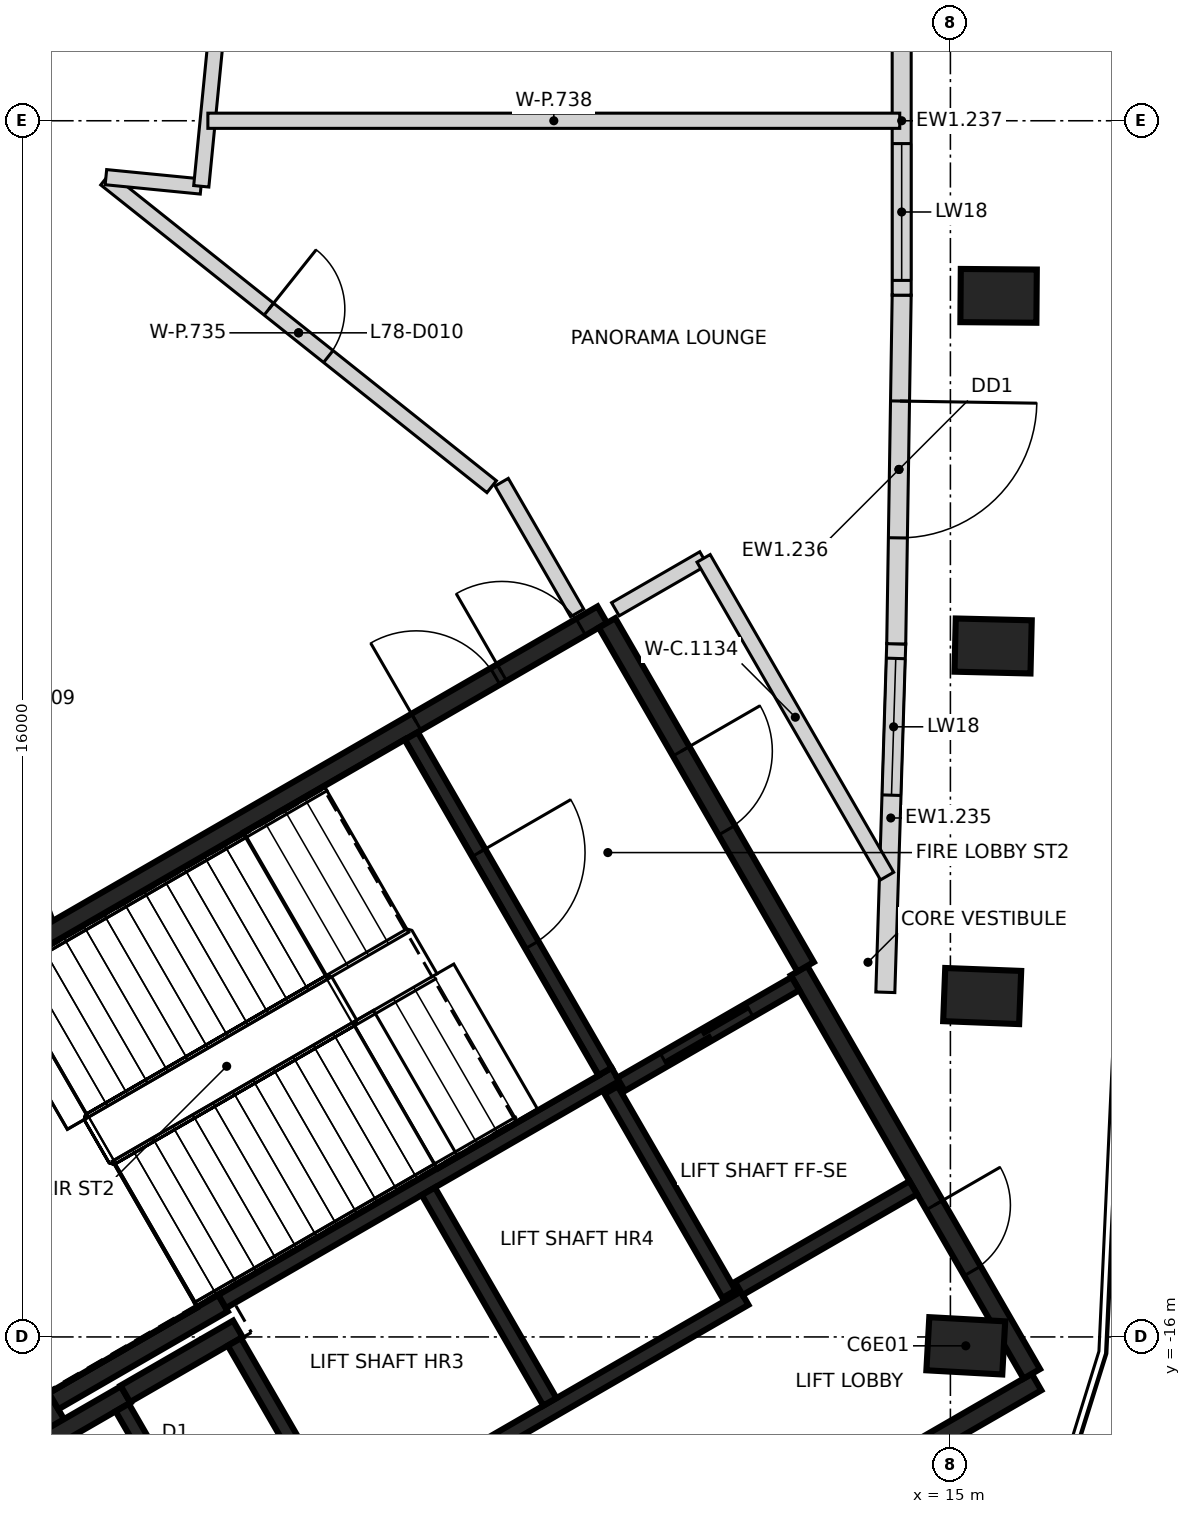
"""IFC4 building model, lengths in metres.
Left out: names, types, materials, properties, quantities, classifications, styles, units other than length and angle.
Written with IfcOpenShell. Run it as: python <this file> out.ifc"""

import sys

from ifc_helpers import new_model, si_unit, direction, frame, frame_2d, origin, origin_2d, place, context, subcontext, project, spatial, rectangle, extrude, element, fill, save


model = new_model("IFC4")
c1 = context("Model", 3, precision=1e-05, world=origin(), true_north=direction((0.0, 1.0)))
c2 = subcontext(c1, "Body", "Model", "MODEL_VIEW")
j1 = project(units=[si_unit("LENGTHUNIT", "METRE"), si_unit("PLANEANGLEUNIT", "RADIAN")], contexts=[c1])
p1 = place(None, origin())
s1 = spatial("IfcSite", under=j1, at=p1, CompositionType="ELEMENT")
p2 = place(p1, origin())
s2 = spatial("IfcBuilding", under=s1, at=p2, CompositionType="ELEMENT")
p3 = place(p2, frame((0.0, 0.0, 312.6)))
s3 = spatial("IfcBuildingStorey", under=s2, at=p3, CompositionType="ELEMENT", Elevation=312.6)
for number, where, z_axis, x_axis in (
    (1, (15.202, -16.117, -0.35), (0.0, 0.0, 1.0), (-0.998, 0.055, 0.0)),
    (2, (15.418, -11.515, -0.35), (0.0, 0.0, 1.0), (-0.999, 0.039, 0.0)),
    (3, (15.562, -6.91, -0.35), (0.0, 0.0, 1.0), (-1.0, 0.024, 0.0)),
    (4, (15.634, -2.303, -0.35), (0.0, 0.0, 1.0), (-1.0, 0.008, 0.0)),
):
    element("IfcColumn", number, at=place(p3, frame(where, z_axis=z_axis, x_axis=x_axis)), inside=s3, PredefinedType="COLUMN", context=c2, shape_type="SweptSolid", body=[
        extrude(rectangle(XDim=1.0, YDim=0.7, at=origin_2d()), origin(), (0.0, 0.0, 1.0), 8.1),
    ])
p4 = place(p3, frame((14.287, -6.88, 0.0), z_axis=(0.0, 0.0, 1.0), x_axis=(-0.03123309125, -0.999512127996, 0.0)))
e5 = element("IfcWall", 5, at=p4, inside=s3, PredefinedType="SOLIDWALL", context=c2, shape_type="SweptSolid", body=[
    extrude(rectangle(XDim=4.588, YDim=0.25, at=frame_2d((2.294, 0.0))), origin(), (0.0, 0.0, 1.0), 7.75),
])
p5 = place(p4, frame((0.194, 0.0, 0.9)))
e6 = element("IfcOpeningElement", 6, at=p5, cuts=e5, PredefinedType="OPENING", context=c2, shape_type="SweptSolid", body=[
    extrude(rectangle(XDim=1.8, YDim=2.4, at=frame_2d((0.9, 1.2))), frame((0.0, 0.135, 0.0), z_axis=(0.0, -1.0, 0.0), x_axis=(1.0, 0.0, 0.0)), (0.0, 0.0, 1.0), 0.27),
])
p6 = place(p3, frame((14.359, -2.293, 0.0), z_axis=(0.0, 0.0, 1.0), x_axis=(-0.015639712785, -0.999877692212, 0.0)))
e7 = element("IfcWall", 7, at=p6, inside=s3, PredefinedType="SOLIDWALL", context=c2, shape_type="SweptSolid", body=[
    extrude(rectangle(XDim=4.589, YDim=0.25, at=frame_2d((2.295, 0.0))), origin(), (0.0, 0.0, 1.0), 7.75),
])
p7 = place(p6, frame((1.395, 0.0, 0.0)))
e8 = element("IfcOpeningElement", 8, at=p7, cuts=e7, PredefinedType="OPENING", context=c2, shape_type="SweptSolid", body=[
    extrude(rectangle(XDim=1.8, YDim=2.4, at=frame_2d((0.9, 1.2))), frame((0.0, 0.135, 0.0), z_axis=(0.0, -1.0, 0.0), x_axis=(1.0, 0.0, 0.0)), (0.0, 0.0, 1.0), 0.27),
])
p8 = place(p3, frame((14.359, 2.295, 0.0), z_axis=(0.0, 0.0, 1.0), x_axis=(0.0, -1.0, 0.0)))
e9 = element("IfcWall", 9, at=p8, inside=s3, PredefinedType="SOLIDWALL", context=c2, shape_type="SweptSolid", body=[
    extrude(rectangle(XDim=4.589, YDim=0.25, at=frame_2d((2.295, 0.0))), origin(), (0.0, 0.0, 1.0), 7.75),
])
p9 = place(p8, frame((2.595, 0.0, 0.9)))
e10 = element("IfcOpeningElement", 10, at=p9, cuts=e9, PredefinedType="OPENING", context=c2, shape_type="SweptSolid", body=[
    extrude(rectangle(XDim=1.8, YDim=2.4, at=frame_2d((0.9, 1.2))), frame((0.0, 0.135, 0.0), z_axis=(0.0, -1.0, 0.0), x_axis=(1.0, 0.0, 0.0)), (0.0, 0.0, 1.0), 0.27),
])
p10 = place(p3, frame((0.417, -12.273, 0.0), z_axis=(0.0, 0.0, 1.0), x_axis=(0.866021906294, 0.500006057782, 0.0)))
e11 = element("IfcWall", 11, at=p10, inside=s3, PredefinedType="SHEAR", context=c2, shape_type="SweptSolid", body=[
    extrude(rectangle(XDim=11.55, YDim=0.25, at=frame_2d((5.775, 0.0))), origin(), (0.0, 0.0, 1.0), 7.75),
])
p11 = place(p10, frame((10.025, 0.0, 0.0)))
e12 = element("IfcOpeningElement", 12, at=p11, cuts=e11, PredefinedType="OPENING", context=c2, shape_type="SweptSolid", body=[
    extrude(rectangle(XDim=1.2, YDim=2.1, at=frame_2d((0.6, 1.05))), frame((0.0, 0.135, 0.0), z_axis=(0.0, -1.0, 0.0), x_axis=(1.0, 0.0, 0.0)), (0.0, 0.0, 1.0), 0.27),
])
p12 = place(p10, frame((8.725, 0.0, 0.0)))
e13 = element("IfcOpeningElement", 13, at=p12, cuts=e11, PredefinedType="OPENING", context=c2, shape_type="SweptSolid", body=[
    extrude(rectangle(XDim=1.2, YDim=2.1, at=frame_2d((0.6, 1.05))), frame((0.0, 0.135, 0.0), z_axis=(0.0, -1.0, 0.0), x_axis=(1.0, 0.0, 0.0)), (0.0, 0.0, 1.0), 0.27),
])
p13 = place(p3, frame((16.133, -16.594, 0.0), z_axis=(0.0, 0.0, 1.0), x_axis=(-0.866022959057, -0.500004234368, 0.0)))
e14 = element("IfcWall", 14, at=p13, inside=s3, PredefinedType="SHEAR", context=c2, shape_type="SweptSolid", body=[
    extrude(rectangle(XDim=8.75, YDim=0.25, at=frame_2d((4.375, 0.0))), origin(), (0.0, 0.0, 1.0), 7.75),
])
p14 = place(p13, frame((3.425, 0.0, 0.0)))
e15 = element("IfcOpeningElement", 15, at=p14, cuts=e14, PredefinedType="OPENING", context=c2, shape_type="SweptSolid", body=[
    extrude(rectangle(XDim=0.9, YDim=2.1, at=frame_2d((0.45, 1.05))), frame((0.0, 0.135, 0.0), z_axis=(0.0, -1.0, 0.0), x_axis=(1.0, 0.0, 0.0)), (0.0, 0.0, 1.0), 0.27),
])
p15 = place(p3, frame((13.008, -11.181, 0.0), z_axis=(0.0, 0.0, 1.0), x_axis=(0.500001955336, -0.866024274868, 0.0)))
e16 = element("IfcWall", 16, at=p15, inside=s3, PredefinedType="SHEAR", context=c2, shape_type="SweptSolid", body=[
    extrude(rectangle(XDim=6.125, YDim=0.25, at=frame_2d((3.062, 0.0))), origin(), (0.0, 0.0, 1.0), 7.75),
])
p16 = place(p15, frame((3.563, 0.0, 0.0)))
e17 = element("IfcOpeningElement", 17, at=p16, cuts=e16, PredefinedType="OPENING", context=c2, shape_type="SweptSolid", body=[
    extrude(rectangle(XDim=1.0, YDim=2.1, at=frame_2d((0.5, 1.05))), frame((0.0, 0.135, 0.0), z_axis=(0.0, -1.0, 0.0), x_axis=(1.0, 0.0, 0.0)), (0.0, 0.0, 1.0), 0.27),
])
p17 = place(p3, frame((3.235, -17.153, 0.0), z_axis=(0.0, 0.0, 1.0), x_axis=(-0.500008851346, 0.866020293397, 0.0)))
e18 = element("IfcWall", 18, at=p17, inside=s3, PredefinedType="SHEAR", context=c2, shape_type="SweptSolid", body=[
    extrude(rectangle(XDim=5.51, YDim=0.25, at=frame_2d((2.755, 0.0))), origin(), (0.0, 0.0, 1.0), 7.75),
])
p18 = place(p3, frame((10.483, -6.606, 0.0), z_axis=(0.0, 0.0, 1.0), x_axis=(0.49999885962, -0.866026062182, 0.0)))
e19 = element("IfcWall", 19, at=p18, inside=s3, PredefinedType="SHEAR", context=c2, shape_type="SweptSolid", body=[
    extrude(rectangle(XDim=5.225, YDim=0.25, at=frame_2d((2.612, 0.0))), origin(), (0.0, 0.0, 1.0), 7.75),
])
p19 = place(p18, frame((1.95, 0.0, 0.0)))
e20 = element("IfcOpeningElement", 20, at=p19, cuts=e19, PredefinedType="OPENING", context=c2, shape_type="SweptSolid", body=[
    extrude(rectangle(XDim=1.2, YDim=2.1, at=frame_2d((0.6, 1.05))), frame((0.0, 0.135, 0.0), z_axis=(0.0, -1.0, 0.0), x_axis=(1.0, 0.0, 0.0)), (0.0, 0.0, 1.0), 0.27),
])
p20 = place(p3, frame((1.669, -18.19, 0.0), z_axis=(0.0, 0.0, 1.0), x_axis=(0.866042235819, 0.499970844928, 0.0)))
e21 = element("IfcWall", 21, at=p20, inside=s3, PredefinedType="SHEAR", context=c2, shape_type="SweptSolid", body=[
    extrude(rectangle(XDim=2.865, YDim=0.25, at=frame_2d((1.432, 0.0))), origin(), (0.0, 0.0, 1.0), 7.75),
])
p21 = place(p3, frame((5.431, -15.556, 0.0), z_axis=(0.0, 0.0, 1.0), x_axis=(-0.866022940537, -0.500004266446, 0.0)))
e22 = element("IfcWall", 22, at=p21, inside=s3, PredefinedType="SHEAR", context=c2, shape_type="SweptSolid", body=[
    extrude(rectangle(XDim=2.575, YDim=0.25, at=frame_2d((1.287, 0.0))), origin(), (0.0, 0.0, 1.0), 7.75),
])
p22 = place(p3, frame((4.145, -16.749, 0.0), z_axis=(0.0, 0.0, 1.0), x_axis=(0.866038183914, 0.499977863513, 0.0)))
e23 = element("IfcWall", 23, at=p22, inside=s3, PredefinedType="SHEAR", context=c2, shape_type="SweptSolid", body=[
    extrude(rectangle(XDim=1.71, YDim=0.25, at=frame_2d((0.855, 0.0))), origin(), (0.0, 0.0, 1.0), 7.75),
])
p23 = place(p3, frame((5.419, -15.534, 0.0), z_axis=(0.0, 0.0, 1.0), x_axis=(0.866029065029, 0.499993658486, 0.0)))
e24 = element("IfcWall", 24, at=p23, inside=s3, PredefinedType="SHEAR", context=c2, shape_type="SweptSolid", body=[
    extrude(rectangle(XDim=5.974, YDim=0.2, at=frame_2d((2.987, 0.0))), origin(), (0.0, 0.0, 1.0), 7.75),
])
p24 = place(p3, frame((7.01, -18.542, 0.0), z_axis=(0.0, 0.0, 1.0), x_axis=(0.866030299012, 0.499991521122, 0.0)))
e25 = element("IfcWall", 25, at=p24, inside=s3, PredefinedType="SHEAR", context=c2, shape_type="SweptSolid", body=[
    extrude(rectangle(XDim=6.1, YDim=0.2, at=frame_2d((3.05, 0.0))), origin(), (0.0, 0.0, 1.0), 7.75),
])
p25 = place(p3, frame((7.906, -8.094, 0.0), z_axis=(0.0, 0.0, 1.0), x_axis=(0.500027839223, -0.866009330205, 0.0)))
e26 = element("IfcWall", 26, at=p25, inside=s3, PredefinedType="SHEAR", context=c2, shape_type="SweptSolid", body=[
    extrude(rectangle(XDim=5.098, YDim=0.2, at=frame_2d((2.549, 0.0))), origin(), (0.0, 0.0, 1.0), 7.75),
])
p26 = place(p25, frame((1.774, 0.0, 0.0)))
e27 = element("IfcOpeningElement", 27, at=p26, cuts=e26, PredefinedType="OPENING", context=c2, shape_type="SweptSolid", body=[
    extrude(rectangle(XDim=1.4, YDim=2.1, at=frame_2d((0.7, 1.05))), frame((0.0, 0.11, 0.0), z_axis=(0.0, -1.0, 0.0), x_axis=(1.0, 0.0, 0.0)), (0.0, 0.0, 1.0), 0.22),
])
p27 = place(p3, frame((8.132, -14.084, 0.0), z_axis=(0.0, 0.0, 1.0), x_axis=(0.499997778408, -0.866026686418, 0.0)))
e28 = element("IfcWall", 28, at=p27, inside=s3, PredefinedType="SHEAR", context=c2, shape_type="SweptSolid", body=[
    extrude(rectangle(XDim=3.198, YDim=0.2, at=frame_2d((1.599, 0.0))), origin(), (0.0, 0.0, 1.0), 7.75),
])
p28 = place(p3, frame((5.503, -19.352, 0.0), z_axis=(0.0, 0.0, 1.0), x_axis=(-0.499986818241, 0.866033014143, 0.0)))
e29 = element("IfcWall", 29, at=p28, inside=s3, PredefinedType="SHEAR", context=c2, shape_type="SweptSolid", body=[
    extrude(rectangle(XDim=2.798, YDim=0.2, at=frame_2d((1.399, 0.0))), origin(), (0.0, 0.0, 1.0), 7.75),
])
p29 = place(p28, frame((0.949, 0.0, 0.0)))
e30 = element("IfcOpeningElement", 30, at=p29, cuts=e29, PredefinedType="OPENING", context=c2, shape_type="SweptSolid", body=[
    extrude(rectangle(XDim=0.9, YDim=2.1, at=frame_2d((0.45, 1.05))), frame((0.0, 0.11, 0.0), z_axis=(0.0, -1.0, 0.0), x_axis=(1.0, 0.0, 0.0)), (0.0, 0.0, 1.0), 0.22),
])
p30 = place(p3, frame((6.96, -18.455, 0.0), z_axis=(0.0, 0.0, 1.0), x_axis=(-0.499926705758, 0.866067716099, 0.0)))
e31 = element("IfcWall", 31, at=p30, inside=s3, PredefinedType="SHEAR", context=c2, shape_type="SweptSolid", body=[
    extrude(rectangle(XDim=2.759, YDim=0.2, at=frame_2d((1.38, 0.0))), origin(), (0.0, 0.0, 1.0), 7.75),
])
p31 = place(p3, frame((12.088, -15.437, 0.0), z_axis=(0.0, 0.0, 1.0), x_axis=(-0.500026960575, 0.86600983753, 0.0)))
e32 = element("IfcWall", 32, at=p31, inside=s3, PredefinedType="SHEAR", context=c2, shape_type="SweptSolid", body=[
    extrude(rectangle(XDim=3.1, YDim=0.2, at=frame_2d((1.55, 0.0))), origin(), (0.0, 0.0, 1.0), 7.75),
])
p32 = place(p3, frame((10.666, -12.678, 0.0), z_axis=(0.0, 0.0, 1.0), x_axis=(0.866018407898, 0.500012117035, 0.0)))
e33 = element("IfcWall", 33, at=p32, inside=s3, PredefinedType="SHEAR", context=c2, shape_type="SweptSolid", body=[
    extrude(rectangle(XDim=2.651, YDim=0.2, at=frame_2d((1.325, 0.0))), origin(), (0.0, 0.0, 1.0), 7.75),
])
p33 = place(p32, frame((0.652, 0.0, 0.0)))
e34 = element("IfcOpeningElement", 34, at=p33, cuts=e33, PredefinedType="OPENING", context=c2, shape_type="SweptSolid", body=[
    extrude(rectangle(XDim=1.3, YDim=2.1, at=frame_2d((0.65, 1.05))), frame((0.0, 0.11, 0.0), z_axis=(0.0, -1.0, 0.0), x_axis=(1.0, 0.0, 0.0)), (0.0, 0.0, 1.0), 0.22),
])
p34 = place(p3, frame((14.512, -14.037, 0.0), z_axis=(0.0, 0.0, 1.0), x_axis=(-0.866018407898, -0.500012117035, 0.0)))
e35 = element("IfcWall", 35, at=p34, inside=s3, PredefinedType="SHEAR", context=c2, shape_type="SweptSolid", body=[
    extrude(rectangle(XDim=2.651, YDim=0.2, at=frame_2d((1.325, 0.0))), origin(), (0.0, 0.0, 1.0), 7.75),
])
p35 = place(p3, frame((10.593, -6.427, 0.0), z_axis=(0.0, 0.0, 1.0), x_axis=(0.866115802186, 0.499843392678, 0.0)))
e36 = element("IfcWall", 36, at=p35, inside=s3, PredefinedType="PARTITIONING", context=c2, shape_type="SweptSolid", body=[
    extrude(rectangle(XDim=1.34, YDim=0.2, at=frame_2d((0.67, 0.0))), origin(), (0.0, 0.0, 1.0), 7.75),
])
p36 = place(p3, frame((11.753, -5.757, 0.0), z_axis=(0.0, 0.0, 1.0), x_axis=(0.500120854176, -0.865955617349, 0.0)))
e37 = element("IfcWall", 37, at=p36, inside=s3, PredefinedType="PARTITIONING", context=c2, shape_type="SweptSolid", body=[
    extrude(rectangle(XDim=4.827, YDim=0.2, at=frame_2d((2.414, 0.0))), origin(), (0.0, 0.0, 1.0), 7.75),
])
p37 = place(p3, frame((0.545, -3.525, 0.0), z_axis=(0.0, 0.0, 1.0), x_axis=(0.343284274362, -0.93923155131, 0.0)))
e38 = element("IfcWall", 38, at=p37, inside=s3, PredefinedType="PARTITIONING", context=c2, shape_type="SweptSolid", body=[
    extrude(rectangle(XDim=7.438, YDim=0.2, at=frame_2d((3.719, 0.0))), origin(), (0.0, 0.0, 1.0), 7.75),
])
p38 = place(p37, frame((3.248, 0.0, 0.0)))
e39 = element("IfcOpeningElement", 39, at=p38, cuts=e38, PredefinedType="OPENING", context=c2, shape_type="SweptSolid", body=[
    extrude(rectangle(XDim=1.0, YDim=2.1, at=frame_2d((0.5, 1.05))), frame((0.0, 0.11, 0.0), z_axis=(0.0, -1.0, 0.0), x_axis=(1.0, 0.0, 0.0)), (0.0, 0.0, 1.0), 0.22),
])
p39 = place(p3, frame((3.884, -0.766, 0.0), z_axis=(0.0, 0.0, 1.0), x_axis=(0.782143113399, -0.623098828568, 0.0)))
e40 = element("IfcWall", 40, at=p39, inside=s3, PredefinedType="PARTITIONING", context=c2, shape_type="SweptSolid", body=[
    extrude(rectangle(XDim=6.496, YDim=0.2, at=frame_2d((3.248, 0.0))), origin(), (0.0, 0.0, 1.0), 7.75),
])
p40 = place(p39, frame((2.748, 0.0, 0.0)))
e41 = element("IfcOpeningElement", 41, at=p40, cuts=e40, PredefinedType="OPENING", context=c2, shape_type="SweptSolid", body=[
    extrude(rectangle(XDim=1.0, YDim=2.1, at=frame_2d((0.5, 1.05))), frame((0.0, 0.11, 0.0), z_axis=(0.0, -1.0, 0.0), x_axis=(1.0, 0.0, 0.0)), (0.0, 0.0, 1.0), 0.22),
])
p41 = place(p3, frame((3.89, -0.742, 0.0), z_axis=(0.0, 0.0, 1.0), x_axis=(0.9951992714, -0.097869352739, 0.0)))
e42 = element("IfcWall", 42, at=p41, inside=s3, PredefinedType="PARTITIONING", context=c2, shape_type="SweptSolid", body=[
    extrude(rectangle(XDim=1.257, YDim=0.2, at=frame_2d((0.629, 0.0))), origin(), (0.0, 0.0, 1.0), 7.75),
])
p42 = place(p3, frame((5.144, -0.862, 0.0), z_axis=(0.0, 0.0, 1.0), x_axis=(0.097767068111, 0.995209324913, 0.0)))
e43 = element("IfcWall", 43, at=p42, inside=s3, PredefinedType="PARTITIONING", context=c2, shape_type="SweptSolid", body=[
    extrude(rectangle(XDim=6.737, YDim=0.2, at=frame_2d((3.369, 0.0))), origin(), (0.0, 0.0, 1.0), 7.75),
])
p43 = place(p42, frame((3.296, 0.0, 0.0)))
e44 = element("IfcOpeningElement", 44, at=p43, cuts=e43, PredefinedType="OPENING", context=c2, shape_type="SweptSolid", body=[
    extrude(rectangle(XDim=1.0, YDim=2.1, at=frame_2d((0.5, 1.05))), frame((0.0, 0.11, 0.0), z_axis=(0.0, -1.0, 0.0), x_axis=(1.0, 0.0, 0.0)), (0.0, 0.0, 1.0), 0.22),
])
p44 = place(p3, frame((5.231, 0.0, 0.0), z_axis=(0.0, 0.0, 1.0), x_axis=(1.0, 0.0, 0.0)))
e45 = element("IfcWall", 45, at=p44, inside=s3, PredefinedType="PARTITIONING", context=c2, shape_type="SweptSolid", body=[
    extrude(rectangle(XDim=9.103, YDim=0.2, at=frame_2d((4.551, 0.0))), origin(), (0.0, 0.0, 1.0), 7.75),
])
p45 = place(p3, frame((9.097, -4.755, 0.0), z_axis=(0.0, 0.0, 1.0), x_axis=(0.499867898641, -0.866101659107, 0.0)))
e46 = element("IfcWall", 46, at=p45, inside=s3, PredefinedType="PARTITIONING", context=c2, shape_type="SweptSolid", body=[
    extrude(rectangle(XDim=1.986, YDim=0.2, at=frame_2d((0.993, 0.0))), origin(), (0.0, 0.0, 1.0), 7.75),
])
p46 = place(p5, origin())
e47 = element("IfcWindow", 47, at=p46, inside=s3, PartitioningType="SINGLE_PANEL", PredefinedType="WINDOW", context=c2, shape_type="SweptSolid", body=[
    extrude(rectangle(XDim=1.8, YDim=2.4, at=frame_2d((0.9, 1.2))), frame((0.0, 0.03, 0.0), z_axis=(0.0, -1.0, 0.0), x_axis=(1.0, 0.0, 0.0)), (0.0, 0.0, 1.0), 0.06),
])
fill(e6, e47)
p47 = place(p7, origin())
e48 = element("IfcDoor", 48, at=p47, inside=s3, OperationType="DOUBLE_DOOR_DOUBLE_SWING", PredefinedType="DOOR", context=c2, shape_type="SweptSolid", body=[
    extrude(rectangle(XDim=1.8, YDim=2.4, at=frame_2d((0.9, 1.2))), frame((0.0, 0.025, 0.0), z_axis=(0.0, -1.0, 0.0), x_axis=(1.0, 0.0, 0.0)), (0.0, 0.0, 1.0), 0.05),
])
fill(e8, e48)
p48 = place(p9, origin())
e49 = element("IfcWindow", 49, at=p48, inside=s3, PartitioningType="SINGLE_PANEL", PredefinedType="WINDOW", context=c2, shape_type="SweptSolid", body=[
    extrude(rectangle(XDim=1.8, YDim=2.4, at=frame_2d((0.9, 1.2))), frame((0.0, 0.03, 0.0), z_axis=(0.0, -1.0, 0.0), x_axis=(1.0, 0.0, 0.0)), (0.0, 0.0, 1.0), 0.06),
])
fill(e10, e49)
p49 = place(p33, origin())
e50 = element("IfcDoor", 50, at=p49, inside=s3, OperationType="SLIDING_TO_LEFT", PredefinedType="DOOR", context=c2, shape_type="SweptSolid", body=[
    extrude(rectangle(XDim=1.3, YDim=2.1, at=frame_2d((0.65, 1.05))), frame((0.0, 0.025, 0.0), z_axis=(0.0, -1.0, 0.0), x_axis=(1.0, 0.0, 0.0)), (0.0, 0.0, 1.0), 0.05),
])
fill(e34, e50)
p50 = place(p16, origin())
e51 = element("IfcDoor", 51, at=p50, inside=s3, OperationType="SINGLE_SWING_LEFT", PredefinedType="DOOR", context=c2, shape_type="SweptSolid", body=[
    extrude(rectangle(XDim=1.0, YDim=2.1, at=frame_2d((0.5, 1.05))), frame((0.0, 0.025, 0.0), z_axis=(0.0, -1.0, 0.0), x_axis=(1.0, 0.0, 0.0)), (0.0, 0.0, 1.0), 0.05),
])
fill(e17, e51)
p51 = place(p11, origin())
e52 = element("IfcDoor", 52, at=p51, inside=s3, OperationType="SINGLE_SWING_LEFT", PredefinedType="DOOR", context=c2, shape_type="SweptSolid", body=[
    extrude(rectangle(XDim=1.2, YDim=2.1, at=frame_2d((0.6, 1.05))), frame((0.0, 0.025, 0.0), z_axis=(0.0, -1.0, 0.0), x_axis=(1.0, 0.0, 0.0)), (0.0, 0.0, 1.0), 0.05),
])
fill(e12, e52)
p52 = place(p12, origin())
e53 = element("IfcDoor", 53, at=p52, inside=s3, OperationType="SINGLE_SWING_RIGHT", PredefinedType="DOOR", context=c2, shape_type="SweptSolid", body=[
    extrude(rectangle(XDim=1.2, YDim=2.1, at=frame_2d((0.6, 1.05))), frame((0.0, 0.025, 0.0), z_axis=(0.0, -1.0, 0.0), x_axis=(1.0, 0.0, 0.0)), (0.0, 0.0, 1.0), 0.05),
])
fill(e13, e53)
p53 = place(p19, origin())
e54 = element("IfcDoor", 54, at=p53, inside=s3, OperationType="SINGLE_SWING_LEFT", PredefinedType="DOOR", context=c2, shape_type="SweptSolid", body=[
    extrude(rectangle(XDim=1.2, YDim=2.1, at=frame_2d((0.6, 1.05))), frame((0.0, 0.025, 0.0), z_axis=(0.0, -1.0, 0.0), x_axis=(1.0, 0.0, 0.0)), (0.0, 0.0, 1.0), 0.05),
])
fill(e20, e54)
p54 = place(p26, origin())
e55 = element("IfcDoor", 55, at=p54, inside=s3, OperationType="SINGLE_SWING_RIGHT", PredefinedType="DOOR", context=c2, shape_type="SweptSolid", body=[
    extrude(rectangle(XDim=1.4, YDim=2.1, at=frame_2d((0.7, 1.05))), frame((0.0, 0.025, 0.0), z_axis=(0.0, -1.0, 0.0), x_axis=(1.0, 0.0, 0.0)), (0.0, 0.0, 1.0), 0.05),
])
fill(e27, e55)
p55 = place(p40, origin())
e56 = element("IfcDoor", 56, at=p55, inside=s3, OperationType="SINGLE_SWING_LEFT", PredefinedType="DOOR", context=c2, shape_type="SweptSolid", body=[
    extrude(rectangle(XDim=1.0, YDim=2.1, at=frame_2d((0.5, 1.05))), frame((0.0, 0.025, 0.0), z_axis=(0.0, -1.0, 0.0), x_axis=(1.0, 0.0, 0.0)), (0.0, 0.0, 1.0), 0.05),
])
fill(e41, e56)
save(model, sys.argv[1])
